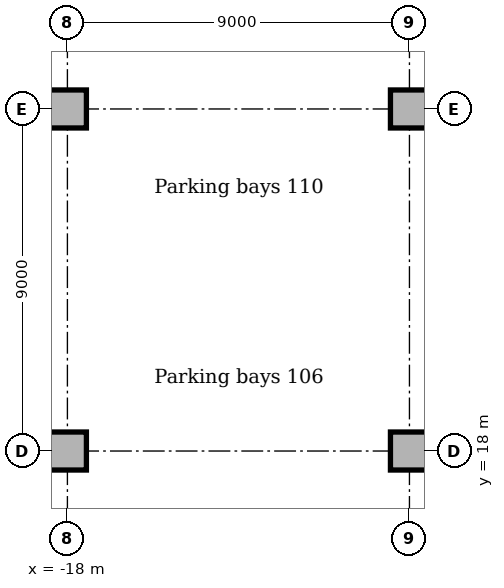
"""IFC4 building model, lengths in metres.
Left out: names, types, materials, properties, quantities, classifications, styles, units other than length and angle.
Written with IfcOpenShell. Run it as: python <this file> out.ifc"""

import sys

from ifc_helpers import new_model, si_unit, direction, frame, origin, origin_2d, place, context, subcontext, project, spatial, rectangle, extrude, element, save


model = new_model("IFC4")
c1 = context("Model", 3, precision=1e-05, world=origin(), true_north=direction((0.0, 1.0)))
c2 = subcontext(c1, "Body", "Model", "MODEL_VIEW")
j1 = project(units=[si_unit("LENGTHUNIT", "METRE"), si_unit("PLANEANGLEUNIT", "RADIAN")], contexts=[c1])
p1 = place(None, origin())
s1 = spatial("IfcSite", under=j1, at=p1, CompositionType="ELEMENT")
p2 = place(p1, origin())
s2 = spatial("IfcBuilding", under=s1, at=p2, CompositionType="ELEMENT")
p3 = place(p2, frame((0.0, 0.0, -5.0)))
s3 = spatial("IfcBuildingStorey", under=s2, at=p3, CompositionType="ELEMENT", Elevation=-5.0)
for number, where, z_axis, x_axis in (
    (1, (-18.0, 18.0, 0.0), (0.0, 0.0, 1.0), (1.0, 0.0, 0.0)),
    (2, (-18.0, 27.0, 0.0), (0.0, 0.0, 1.0), (1.0, 0.0, 0.0)),
    (3, (-9.0, 18.0, 0.0), (0.0, 0.0, 1.0), (1.0, 0.0, 0.0)),
    (4, (-9.0, 27.0, 0.0), (0.0, 0.0, 1.0), (1.0, 0.0, 0.0)),
):
    element("IfcColumn", number, at=place(p3, frame(where, z_axis=z_axis, x_axis=x_axis)), inside=s3, PredefinedType="COLUMN", context=c2, shape_type="SweptSolid", body=[
        extrude(rectangle(XDim=1.0, YDim=1.0, at=origin_2d()), origin(), (0.0, 0.0, 1.0), 4.7),
    ])
save(model, sys.argv[1])
